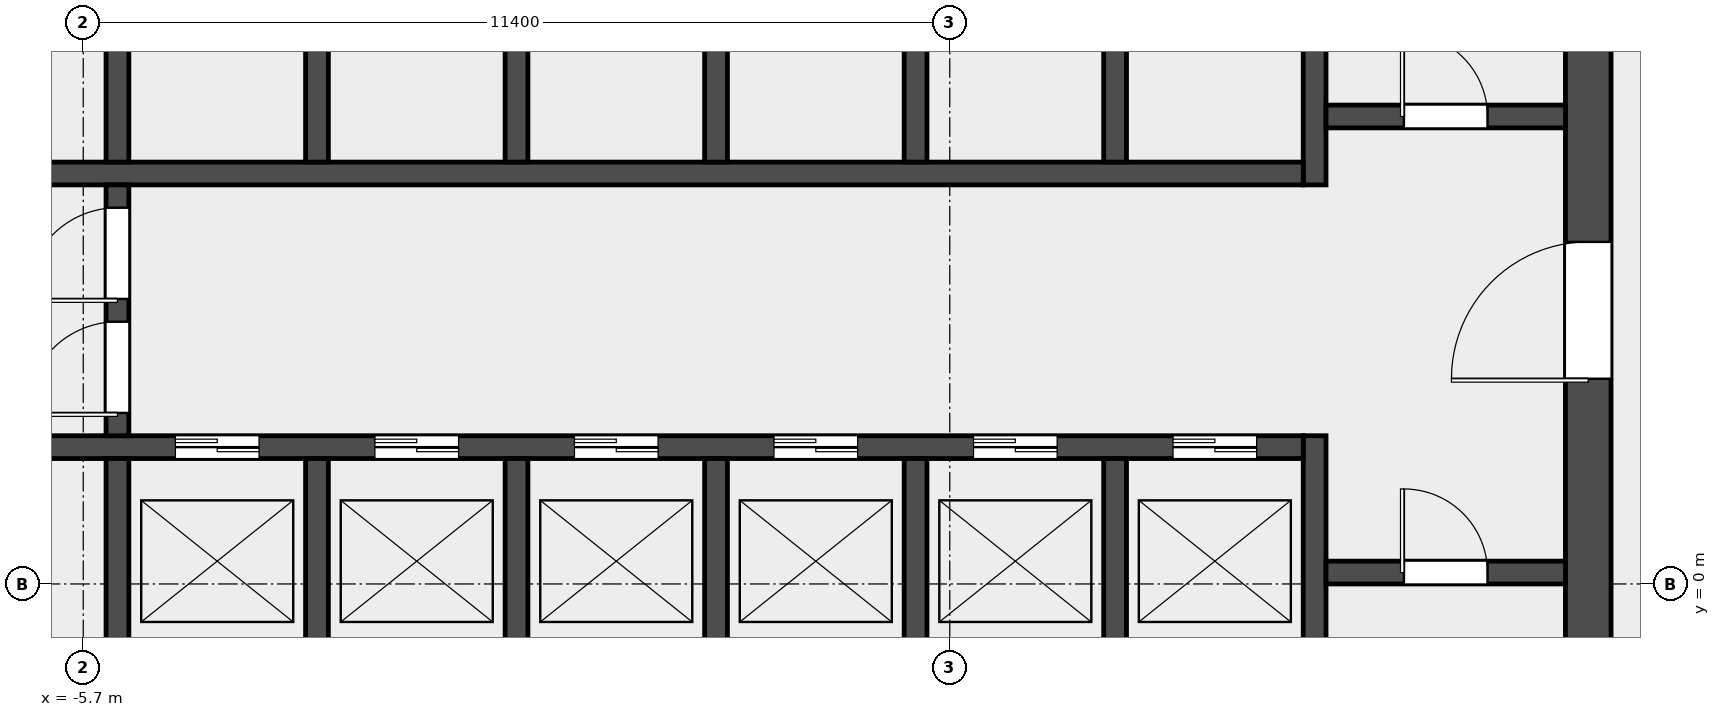
"""IFC4 building model, lengths in metres.
Left out: names, types, materials, properties, quantities, classifications, styles, units other than length and angle.
Written with IfcOpenShell. Run it as: python <this file> out.ifc"""

import sys

from ifc_helpers import new_model, si_unit, direction, frame, frame_2d, origin, place, context, subcontext, project, spatial, rectangle, extrude, element, fill, save


model = new_model("IFC4")
c1 = context("Model", 3, precision=1e-05, world=origin(), true_north=direction((0.0, 1.0)))
c2 = subcontext(c1, "Body", "Model", "MODEL_VIEW")
j1 = project(units=[si_unit("LENGTHUNIT", "METRE"), si_unit("PLANEANGLEUNIT", "RADIAN")], contexts=[c1])
p1 = place(None, origin())
s1 = spatial("IfcSite", under=j1, at=p1, CompositionType="ELEMENT")
p2 = place(p1, origin())
s2 = spatial("IfcBuilding", under=s1, at=p2, CompositionType="ELEMENT")
p3 = place(p2, frame((0.0, 0.0, 185.0)))
s3 = spatial("IfcBuildingStorey", under=s2, at=p3, CompositionType="ELEMENT", Elevation=185.0)
p4 = place(p3, frame((14.1, -6.6, 0.0), z_axis=(0.0, 0.0, 1.0), x_axis=(0.0, 1.0, 0.0)))
e1 = element("IfcWall", 1, at=p4, inside=s3, PredefinedType="SHEAR", context=c2, shape_type="SweptSolid", body=[
    extrude(rectangle(XDim=19.5, YDim=0.6, at=frame_2d((9.75, 0.0))), origin(), (0.0, 0.0, 1.0), 3.7),
])
p5 = place(p4, frame((9.3, 0.0, 0.0)))
e2 = element("IfcOpeningElement", 2, at=p5, cuts=e1, PredefinedType="OPENING", context=c2, shape_type="SweptSolid", body=[
    extrude(rectangle(XDim=1.8, YDim=2.1, at=frame_2d((0.9, 1.05))), frame((0.0, 0.312, 0.0), z_axis=(0.0, -1.0, 0.0), x_axis=(1.0, 0.0, 0.0)), (0.0, 0.0, 1.0), 0.624),
])
p6 = place(p3, frame((10.5, -6.6, 0.0), z_axis=(0.0, 0.0, 1.0), x_axis=(0.0, 1.0, 0.0)))
e3 = element("IfcWall", 3, at=p6, inside=s3, PredefinedType="SHEAR", context=c2, shape_type="SweptSolid", body=[
    extrude(rectangle(XDim=8.55, YDim=0.3, at=frame_2d((4.275, 0.0))), origin(), (0.0, 0.0, 1.0), 3.7),
])
p7 = place(p3, frame((10.5, 5.25, 0.0), z_axis=(0.0, 0.0, 1.0), x_axis=(0.0, 1.0, 0.0)))
e4 = element("IfcWall", 4, at=p7, inside=s3, PredefinedType="SHEAR", context=c2, shape_type="SweptSolid", body=[
    extrude(rectangle(XDim=7.65, YDim=0.3, at=frame_2d((3.825, 0.0))), origin(), (0.0, 0.0, 1.0), 3.7),
])
p8 = place(p3, frame((10.65, 0.15, 0.0), z_axis=(0.0, 0.0, 1.0), x_axis=(1.0, 0.0, 0.0)))
e5 = element("IfcWall", 5, at=p8, inside=s3, PredefinedType="SOLIDWALL", context=c2, shape_type="SweptSolid", body=[
    extrude(rectangle(XDim=3.15, YDim=0.3, at=frame_2d((1.575, 0.0))), origin(), (0.0, 0.0, 1.0), 3.7),
])
p9 = place(p8, frame((1.025, 0.0, 0.0)))
e6 = element("IfcOpeningElement", 6, at=p9, cuts=e5, PredefinedType="OPENING", context=c2, shape_type="SweptSolid", body=[
    extrude(rectangle(XDim=1.1, YDim=2.1, at=frame_2d((0.55, 1.05))), frame((0.0, 0.162, 0.0), z_axis=(0.0, -1.0, 0.0), x_axis=(1.0, 0.0, 0.0)), (0.0, 0.0, 1.0), 0.324),
])
p10 = place(p3, frame((10.65, 6.15, 0.0), z_axis=(0.0, 0.0, 1.0), x_axis=(1.0, 0.0, 0.0)))
e7 = element("IfcWall", 7, at=p10, inside=s3, PredefinedType="SOLIDWALL", context=c2, shape_type="SweptSolid", body=[
    extrude(rectangle(XDim=3.15, YDim=0.3, at=frame_2d((1.575, 0.0))), origin(), (0.0, 0.0, 1.0), 3.7),
])
p11 = place(p10, frame((1.025, 0.0, 0.0)))
e8 = element("IfcOpeningElement", 8, at=p11, cuts=e7, PredefinedType="OPENING", context=c2, shape_type="SweptSolid", body=[
    extrude(rectangle(XDim=1.1, YDim=2.1, at=frame_2d((0.55, 1.05))), frame((0.0, 0.162, 0.0), z_axis=(0.0, -1.0, 0.0), x_axis=(1.0, 0.0, 0.0)), (0.0, 0.0, 1.0), 0.324),
])
p12 = place(p3, frame((-10.35, 1.8, 0.0), z_axis=(0.0, 0.0, 1.0), x_axis=(1.0, 0.0, 0.0)))
e9 = element("IfcWall", 9, at=p12, inside=s3, PredefinedType="SOLIDWALL", context=c2, shape_type="SweptSolid", body=[
    extrude(rectangle(XDim=20.7, YDim=0.3, at=frame_2d((10.35, 0.0))), origin(), (0.0, 0.0, 1.0), 3.7),
])
p13 = place(p12, frame((0.512, 0.0, 0.0)))
e10 = element("IfcOpeningElement", 10, at=p13, cuts=e9, PredefinedType="OPENING", context=c2, shape_type="SweptSolid", body=[
    extrude(rectangle(XDim=1.3, YDim=2.1, at=frame_2d((0.65, 1.05))), frame((0.0, 0.162, 0.0), z_axis=(0.0, -1.0, 0.0), x_axis=(1.0, 0.0, 0.0)), (0.0, 0.0, 1.0), 0.324),
])
p14 = place(p12, frame((5.863, 0.0, 0.0)))
e11 = element("IfcOpeningElement", 11, at=p14, cuts=e9, PredefinedType="OPENING", context=c2, shape_type="SweptSolid", body=[
    extrude(rectangle(XDim=1.1, YDim=2.1, at=frame_2d((0.55, 1.05))), frame((0.0, 0.162, 0.0), z_axis=(0.0, -1.0, 0.0), x_axis=(1.0, 0.0, 0.0)), (0.0, 0.0, 1.0), 0.324),
])
p15 = place(p12, frame((8.488, 0.0, 0.0)))
e12 = element("IfcOpeningElement", 12, at=p15, cuts=e9, PredefinedType="OPENING", context=c2, shape_type="SweptSolid", body=[
    extrude(rectangle(XDim=1.1, YDim=2.1, at=frame_2d((0.55, 1.05))), frame((0.0, 0.162, 0.0), z_axis=(0.0, -1.0, 0.0), x_axis=(1.0, 0.0, 0.0)), (0.0, 0.0, 1.0), 0.324),
])
p16 = place(p12, frame((11.113, 0.0, 0.0)))
e13 = element("IfcOpeningElement", 13, at=p16, cuts=e9, PredefinedType="OPENING", context=c2, shape_type="SweptSolid", body=[
    extrude(rectangle(XDim=1.1, YDim=2.1, at=frame_2d((0.55, 1.05))), frame((0.0, 0.162, 0.0), z_axis=(0.0, -1.0, 0.0), x_axis=(1.0, 0.0, 0.0)), (0.0, 0.0, 1.0), 0.324),
])
p17 = place(p12, frame((13.738, 0.0, 0.0)))
e14 = element("IfcOpeningElement", 14, at=p17, cuts=e9, PredefinedType="OPENING", context=c2, shape_type="SweptSolid", body=[
    extrude(rectangle(XDim=1.1, YDim=2.1, at=frame_2d((0.55, 1.05))), frame((0.0, 0.162, 0.0), z_axis=(0.0, -1.0, 0.0), x_axis=(1.0, 0.0, 0.0)), (0.0, 0.0, 1.0), 0.324),
])
p18 = place(p12, frame((16.363, 0.0, 0.0)))
e15 = element("IfcOpeningElement", 15, at=p18, cuts=e9, PredefinedType="OPENING", context=c2, shape_type="SweptSolid", body=[
    extrude(rectangle(XDim=1.1, YDim=2.1, at=frame_2d((0.55, 1.05))), frame((0.0, 0.162, 0.0), z_axis=(0.0, -1.0, 0.0), x_axis=(1.0, 0.0, 0.0)), (0.0, 0.0, 1.0), 0.324),
])
p19 = place(p12, frame((18.988, 0.0, 0.0)))
e16 = element("IfcOpeningElement", 16, at=p19, cuts=e9, PredefinedType="OPENING", context=c2, shape_type="SweptSolid", body=[
    extrude(rectangle(XDim=1.1, YDim=2.1, at=frame_2d((0.55, 1.05))), frame((0.0, 0.162, 0.0), z_axis=(0.0, -1.0, 0.0), x_axis=(1.0, 0.0, 0.0)), (0.0, 0.0, 1.0), 0.324),
])
p20 = place(p3, frame((-10.35, 5.4, 0.0), z_axis=(0.0, 0.0, 1.0), x_axis=(1.0, 0.0, 0.0)))
e17 = element("IfcWall", 17, at=p20, inside=s3, PredefinedType="SOLIDWALL", context=c2, shape_type="SweptSolid", body=[
    extrude(rectangle(XDim=20.7, YDim=0.3, at=frame_2d((10.35, 0.0))), origin(), (0.0, 0.0, 1.0), 3.7),
])
p21 = place(p20, frame((0.512, 0.0, 0.0)))
e18 = element("IfcOpeningElement", 18, at=p21, cuts=e17, PredefinedType="OPENING", context=c2, shape_type="SweptSolid", body=[
    extrude(rectangle(XDim=1.3, YDim=2.1, at=frame_2d((0.65, 1.05))), frame((0.0, 0.162, 0.0), z_axis=(0.0, -1.0, 0.0), x_axis=(1.0, 0.0, 0.0)), (0.0, 0.0, 1.0), 0.324),
])
for number, where, z_axis, x_axis in (
    (19, (-5.25, -1.05, 0.0), (0.0, 0.0, 1.0), (0.0, 1.0, 0.0)),
    (20, (-2.625, -1.05, 0.0), (0.0, 0.0, 1.0), (0.0, 1.0, 0.0)),
    (21, (0.0, -1.05, 0.0), (0.0, 0.0, 1.0), (0.0, 1.0, 0.0)),
    (22, (2.625, -1.05, 0.0), (0.0, 0.0, 1.0), (0.0, 1.0, 0.0)),
    (23, (5.25, -1.05, 0.0), (0.0, 0.0, 1.0), (0.0, 1.0, 0.0)),
    (24, (7.875, -1.05, 0.0), (0.0, 0.0, 1.0), (0.0, 1.0, 0.0)),
    (25, (-5.25, 5.55, 0.0), (0.0, 0.0, 1.0), (0.0, 1.0, 0.0)),
    (26, (-2.625, 5.55, 0.0), (0.0, 0.0, 1.0), (0.0, 1.0, 0.0)),
    (27, (0.0, 5.55, 0.0), (0.0, 0.0, 1.0), (0.0, 1.0, 0.0)),
    (28, (2.625, 5.55, 0.0), (0.0, 0.0, 1.0), (0.0, 1.0, 0.0)),
    (29, (5.25, 5.55, 0.0), (0.0, 0.0, 1.0), (0.0, 1.0, 0.0)),
    (30, (7.875, 5.55, 0.0), (0.0, 0.0, 1.0), (0.0, 1.0, 0.0)),
):
    element("IfcWall", number, at=place(p3, frame(where, z_axis=z_axis, x_axis=x_axis)), inside=s3, PredefinedType="SOLIDWALL", context=c2, shape_type="SweptSolid", body=[
        extrude(rectangle(XDim=2.7, YDim=0.3, at=frame_2d((1.35, 0.0))), origin(), (0.0, 0.0, 1.0), 3.7),
    ])
p22 = place(p3, frame((-5.25, 1.95, 0.0), z_axis=(0.0, 0.0, 1.0), x_axis=(0.0, 1.0, 0.0)))
e31 = element("IfcWall", 31, at=p22, inside=s3, PredefinedType="SOLIDWALL", context=c2, shape_type="SweptSolid", body=[
    extrude(rectangle(XDim=3.3, YDim=0.3, at=frame_2d((1.65, 0.0))), origin(), (0.0, 0.0, 1.0), 3.7),
])
p23 = place(p22, frame((0.3, 0.0, 0.0)))
e32 = element("IfcOpeningElement", 32, at=p23, cuts=e31, PredefinedType="OPENING", context=c2, shape_type="SweptSolid", body=[
    extrude(rectangle(XDim=1.2, YDim=2.1, at=frame_2d((0.6, 1.05))), frame((0.0, 0.162, 0.0), z_axis=(0.0, -1.0, 0.0), x_axis=(1.0, 0.0, 0.0)), (0.0, 0.0, 1.0), 0.324),
])
p24 = place(p22, frame((1.8, 0.0, 0.0)))
e33 = element("IfcOpeningElement", 33, at=p24, cuts=e31, PredefinedType="OPENING", context=c2, shape_type="SweptSolid", body=[
    extrude(rectangle(XDim=1.2, YDim=2.1, at=frame_2d((0.6, 1.05))), frame((0.0, 0.162, 0.0), z_axis=(0.0, -1.0, 0.0), x_axis=(1.0, 0.0, 0.0)), (0.0, 0.0, 1.0), 0.324),
])
p25 = place(p9, origin())
e34 = element("IfcDoor", 34, at=p25, inside=s3, OperationType="SINGLE_SWING_RIGHT", PredefinedType="DOOR", context=c2, shape_type="SweptSolid", body=[
    extrude(rectangle(XDim=1.1, YDim=2.1, at=frame_2d((0.55, 1.05))), frame((0.0, 0.025, 0.0), z_axis=(0.0, -1.0, 0.0), x_axis=(1.0, 0.0, 0.0)), (0.0, 0.0, 1.0), 0.05),
])
fill(e6, e34)
p26 = place(p11, origin())
e35 = element("IfcDoor", 35, at=p26, inside=s3, OperationType="SINGLE_SWING_RIGHT", PredefinedType="DOOR", context=c2, shape_type="SweptSolid", body=[
    extrude(rectangle(XDim=1.1, YDim=2.1, at=frame_2d((0.55, 1.05))), frame((0.0, 0.025, 0.0), z_axis=(0.0, -1.0, 0.0), x_axis=(1.0, 0.0, 0.0)), (0.0, 0.0, 1.0), 0.05),
])
fill(e8, e35)
p27 = place(p5, origin())
e36 = element("IfcDoor", 36, at=p27, inside=s3, OperationType="DOUBLE_DOOR_SINGLE_SWING", PredefinedType="DOOR", context=c2, shape_type="SweptSolid", body=[
    extrude(rectangle(XDim=1.8, YDim=2.1, at=frame_2d((0.9, 1.05))), frame((0.0, 0.025, 0.0), z_axis=(0.0, -1.0, 0.0), x_axis=(1.0, 0.0, 0.0)), (0.0, 0.0, 1.0), 0.05),
])
fill(e2, e36)
p28 = place(p23, origin())
e37 = element("IfcDoor", 37, at=p28, inside=s3, OperationType="SINGLE_SWING_LEFT", PredefinedType="DOOR", context=c2, shape_type="SweptSolid", body=[
    extrude(rectangle(XDim=1.2, YDim=2.1, at=frame_2d((0.6, 1.05))), frame((0.0, 0.025, 0.0), z_axis=(0.0, -1.0, 0.0), x_axis=(1.0, 0.0, 0.0)), (0.0, 0.0, 1.0), 0.05),
])
fill(e32, e37)
p29 = place(p24, origin())
e38 = element("IfcDoor", 38, at=p29, inside=s3, OperationType="SINGLE_SWING_RIGHT", PredefinedType="DOOR", context=c2, shape_type="SweptSolid", body=[
    extrude(rectangle(XDim=1.2, YDim=2.1, at=frame_2d((0.6, 1.05))), frame((0.0, 0.025, 0.0), z_axis=(0.0, -1.0, 0.0), x_axis=(1.0, 0.0, 0.0)), (0.0, 0.0, 1.0), 0.05),
])
fill(e33, e38)
p30 = place(p14, origin())
e39 = element("IfcDoor", 39, at=p30, inside=s3, OperationType="DOUBLE_DOOR_SLIDING", PredefinedType="DOOR", context=c2, shape_type="SweptSolid", body=[
    extrude(rectangle(XDim=1.1, YDim=2.1, at=frame_2d((0.55, 1.05))), frame((0.0, 0.025, 0.0), z_axis=(0.0, -1.0, 0.0), x_axis=(1.0, 0.0, 0.0)), (0.0, 0.0, 1.0), 0.05),
])
fill(e11, e39)
p31 = place(p15, origin())
e40 = element("IfcDoor", 40, at=p31, inside=s3, OperationType="DOUBLE_DOOR_SLIDING", PredefinedType="DOOR", context=c2, shape_type="SweptSolid", body=[
    extrude(rectangle(XDim=1.1, YDim=2.1, at=frame_2d((0.55, 1.05))), frame((0.0, 0.025, 0.0), z_axis=(0.0, -1.0, 0.0), x_axis=(1.0, 0.0, 0.0)), (0.0, 0.0, 1.0), 0.05),
])
fill(e12, e40)
p32 = place(p16, origin())
e41 = element("IfcDoor", 41, at=p32, inside=s3, OperationType="DOUBLE_DOOR_SLIDING", PredefinedType="DOOR", context=c2, shape_type="SweptSolid", body=[
    extrude(rectangle(XDim=1.1, YDim=2.1, at=frame_2d((0.55, 1.05))), frame((0.0, 0.025, 0.0), z_axis=(0.0, -1.0, 0.0), x_axis=(1.0, 0.0, 0.0)), (0.0, 0.0, 1.0), 0.05),
])
fill(e13, e41)
p33 = place(p17, origin())
e42 = element("IfcDoor", 42, at=p33, inside=s3, OperationType="DOUBLE_DOOR_SLIDING", PredefinedType="DOOR", context=c2, shape_type="SweptSolid", body=[
    extrude(rectangle(XDim=1.1, YDim=2.1, at=frame_2d((0.55, 1.05))), frame((0.0, 0.025, 0.0), z_axis=(0.0, -1.0, 0.0), x_axis=(1.0, 0.0, 0.0)), (0.0, 0.0, 1.0), 0.05),
])
fill(e14, e42)
p34 = place(p18, origin())
e43 = element("IfcDoor", 43, at=p34, inside=s3, OperationType="DOUBLE_DOOR_SLIDING", PredefinedType="DOOR", context=c2, shape_type="SweptSolid", body=[
    extrude(rectangle(XDim=1.1, YDim=2.1, at=frame_2d((0.55, 1.05))), frame((0.0, 0.025, 0.0), z_axis=(0.0, -1.0, 0.0), x_axis=(1.0, 0.0, 0.0)), (0.0, 0.0, 1.0), 0.05),
])
fill(e15, e43)
p35 = place(p19, origin())
e44 = element("IfcDoor", 44, at=p35, inside=s3, OperationType="DOUBLE_DOOR_SLIDING", PredefinedType="DOOR", context=c2, shape_type="SweptSolid", body=[
    extrude(rectangle(XDim=1.1, YDim=2.1, at=frame_2d((0.55, 1.05))), frame((0.0, 0.025, 0.0), z_axis=(0.0, -1.0, 0.0), x_axis=(1.0, 0.0, 0.0)), (0.0, 0.0, 1.0), 0.05),
])
fill(e16, e44)
save(model, sys.argv[1])
